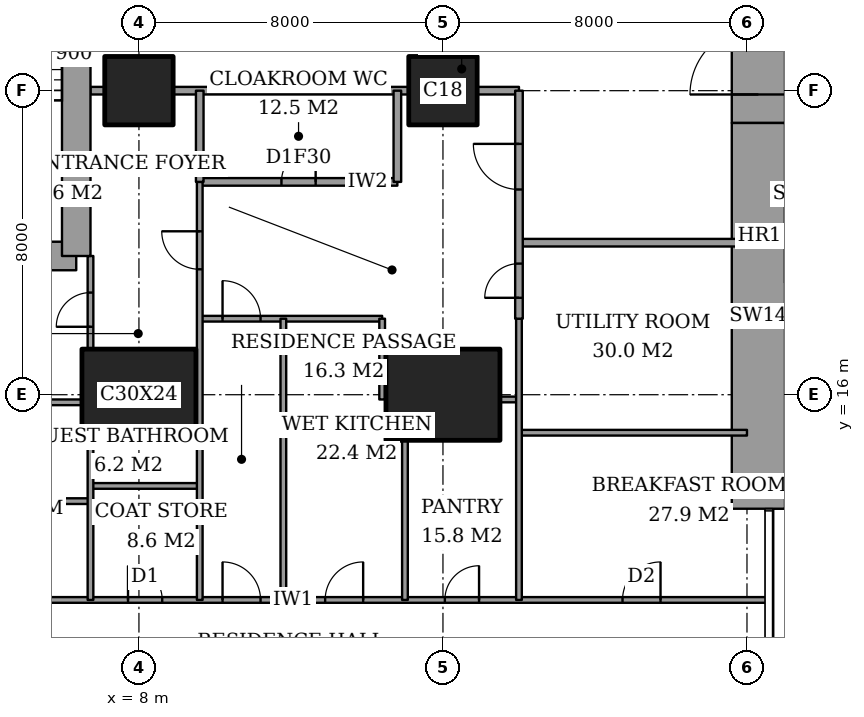
"""IFC4 building model, lengths in metres.
Left out: names, types, materials, properties, quantities, classifications, styles, units other than length and angle.
Written with IfcOpenShell. Run it as: python <this file> out.ifc"""

import sys

from ifc_helpers import new_model, si_unit, direction, frame, frame_2d, origin, origin_2d, place, context, subcontext, project, spatial, rectangle, extrude, element, fill, save


model = new_model("IFC4")
c1 = context("Model", 3, precision=1e-05, world=origin(), true_north=direction((0.0, 1.0)))
c2 = subcontext(c1, "Body", "Model", "MODEL_VIEW")
j1 = project(units=[si_unit("LENGTHUNIT", "METRE"), si_unit("PLANEANGLEUNIT", "RADIAN")], contexts=[c1])
p1 = place(None, origin())
s1 = spatial("IfcSite", under=j1, at=p1, CompositionType="ELEMENT")
p2 = place(p1, origin())
s2 = spatial("IfcBuilding", under=s1, at=p2, CompositionType="ELEMENT")
p3 = place(p2, frame((0.0, 0.0, 211.0)))
s3 = spatial("IfcBuildingStorey", under=s2, at=p3, CompositionType="ELEMENT", Elevation=211.0)
p4 = place(p3, frame((8.0, 16.0, 0.0), z_axis=(0.0, 0.0, 1.0), x_axis=(1.0, 0.0, 0.0)))
e1 = element("IfcColumn", 1, at=p4, inside=s3, PredefinedType="COLUMN", context=c2, shape_type="SweptSolid", body=[
    extrude(rectangle(XDim=3.0, YDim=2.4, at=origin_2d()), origin(), (0.0, 0.0, 1.0), 3.6),
])
p5 = place(p3, frame((8.0, 24.0, 0.0), z_axis=(0.0, 0.0, 1.0), x_axis=(1.0, 0.0, 0.0)))
e2 = element("IfcColumn", 2, at=p5, inside=s3, PredefinedType="COLUMN", context=c2, shape_type="SweptSolid", body=[
    extrude(rectangle(XDim=1.8, YDim=1.8, at=origin_2d()), origin(), (0.0, 0.0, 1.0), 3.6),
])
p6 = place(p3, frame((16.0, 16.0, 0.0), z_axis=(0.0, 0.0, 1.0), x_axis=(1.0, 0.0, 0.0)))
e3 = element("IfcColumn", 3, at=p6, inside=s3, PredefinedType="COLUMN", context=c2, shape_type="SweptSolid", body=[
    extrude(rectangle(XDim=3.0, YDim=2.4, at=origin_2d()), origin(), (0.0, 0.0, 1.0), 3.6),
])
p7 = place(p3, frame((16.0, 24.0, 0.0), z_axis=(0.0, 0.0, 1.0), x_axis=(1.0, 0.0, 0.0)))
e4 = element("IfcColumn", 4, at=p7, inside=s3, PredefinedType="COLUMN", context=c2, shape_type="SweptSolid", body=[
    extrude(rectangle(XDim=1.8, YDim=1.8, at=origin_2d()), origin(), (0.0, 0.0, 1.0), 3.6),
])
p8 = place(p3, frame((24.3, 13.0, 0.0), z_axis=(0.0, 0.0, 1.0), x_axis=(0.0, 1.0, 0.0)))
e5 = element("IfcWall", 5, at=p8, inside=s3, PredefinedType="SHEAR", context=c2, shape_type="SweptSolid", body=[
    extrude(rectangle(XDim=10.15, YDim=1.4, at=frame_2d((5.075, 0.0))), origin(), (0.0, 0.0, 1.0), 3.6),
])
p9 = place(p3, frame((24.3, 23.15, 0.0), z_axis=(0.0, 0.0, 1.0), x_axis=(0.0, 1.0, 0.0)))
e6 = element("IfcWall", 6, at=p9, inside=s3, PredefinedType="SHEAR", context=c2, shape_type="SweptSolid", body=[
    extrude(rectangle(XDim=11.85, YDim=1.4, at=frame_2d((5.925, 0.0))), origin(), (0.0, 0.0, 1.0), 3.6),
])
p10 = place(p9, frame((0.75, 0.0, 0.0)))
e7 = element("IfcOpeningElement", 7, at=p10, cuts=e6, PredefinedType="OPENING", context=c2, shape_type="SweptSolid", body=[
    extrude(rectangle(XDim=1.8, YDim=2.4, at=frame_2d((0.9, 1.2))), frame((0.0, 0.71, 0.0), z_axis=(0.0, -1.0, 0.0), x_axis=(1.0, 0.0, 0.0)), (0.0, 0.0, 1.0), 1.42),
])
p11 = place(p3, frame((1.9, 19.65, 0.0), z_axis=(0.0, 0.0, 1.0), x_axis=(1.0, 0.0, 0.0)))
e8 = element("IfcWall", 8, at=p11, inside=s3, PredefinedType="SHEAR", context=c2, shape_type="SweptSolid", body=[
    extrude(rectangle(XDim=4.45, YDim=0.75, at=frame_2d((2.225, 0.0))), origin(), (0.0, 0.0, 1.0), 3.6),
])
p12 = place(p3, frame((6.35, 19.65, 0.0), z_axis=(0.0, 0.0, 1.0), x_axis=(0.0, 1.0, 0.0)))
e9 = element("IfcWall", 9, at=p12, inside=s3, PredefinedType="SHEAR", context=c2, shape_type="SweptSolid", body=[
    extrude(rectangle(XDim=8.7, YDim=0.75, at=frame_2d((4.35, 0.0))), origin(), (0.0, 0.0, 1.0), 3.6),
])
p13 = place(p12, frame((6.725, 0.0, 0.0)))
e10 = element("IfcOpeningElement", 10, at=p13, cuts=e9, PredefinedType="OPENING", context=c2, shape_type="SweptSolid", body=[
    extrude(rectangle(XDim=1.0, YDim=2.1, at=frame_2d((0.5, 1.05))), frame((0.0, 0.385, 0.0), z_axis=(0.0, -1.0, 0.0), x_axis=(1.0, 0.0, 0.0)), (0.0, 0.0, 1.0), 0.77),
])
p14 = place(p3, frame((-0.45, 10.6, 0.0), z_axis=(0.0, 0.0, 1.0), x_axis=(1.0, 0.0, 0.0)))
e11 = element("IfcWall", 11, at=p14, inside=s3, PredefinedType="PARTITIONING", context=c2, shape_type="SweptSolid", body=[
    extrude(rectangle(XDim=25.011, YDim=0.15, at=frame_2d((12.505, 0.0))), origin(), (0.0, 0.0, 1.0), 3.35),
])
p15 = place(p14, frame((10.65, 0.0, 0.0)))
e12 = element("IfcOpeningElement", 12, at=p15, cuts=e11, PredefinedType="OPENING", context=c2, shape_type="SweptSolid", body=[
    extrude(rectangle(XDim=1.0, YDim=2.1, at=frame_2d((0.5, 1.05))), frame((0.0, 0.085, 0.0), z_axis=(0.0, -1.0, 0.0), x_axis=(1.0, 0.0, 0.0)), (0.0, 0.0, 1.0), 0.17),
])
p16 = place(p14, frame((3.087, 0.0, 0.0)))
e13 = element("IfcOpeningElement", 13, at=p16, cuts=e11, PredefinedType="OPENING", context=c2, shape_type="SweptSolid", body=[
    extrude(rectangle(XDim=1.0, YDim=2.1, at=frame_2d((0.5, 1.05))), frame((0.0, 0.085, 0.0), z_axis=(0.0, -1.0, 0.0), x_axis=(1.0, 0.0, 0.0)), (0.0, 0.0, 1.0), 0.17),
])
p17 = place(p14, frame((8.163, 0.0, 0.0)))
e14 = element("IfcOpeningElement", 14, at=p17, cuts=e11, PredefinedType="OPENING", context=c2, shape_type="SweptSolid", body=[
    extrude(rectangle(XDim=0.9, YDim=2.1, at=frame_2d((0.45, 1.05))), frame((0.0, 0.085, 0.0), z_axis=(0.0, -1.0, 0.0), x_axis=(1.0, 0.0, 0.0)), (0.0, 0.0, 1.0), 0.17),
])
p18 = place(p14, frame((13.35, 0.0, 0.0)))
e15 = element("IfcOpeningElement", 15, at=p18, cuts=e11, PredefinedType="OPENING", context=c2, shape_type="SweptSolid", body=[
    extrude(rectangle(XDim=1.0, YDim=2.1, at=frame_2d((0.5, 1.05))), frame((0.0, 0.085, 0.0), z_axis=(0.0, -1.0, 0.0), x_axis=(1.0, 0.0, 0.0)), (0.0, 0.0, 1.0), 0.17),
])
p19 = place(p14, frame((16.5, 0.0, 0.0)))
e16 = element("IfcOpeningElement", 16, at=p19, cuts=e11, PredefinedType="OPENING", context=c2, shape_type="SweptSolid", body=[
    extrude(rectangle(XDim=0.9, YDim=2.1, at=frame_2d((0.45, 1.05))), frame((0.0, 0.085, 0.0), z_axis=(0.0, -1.0, 0.0), x_axis=(1.0, 0.0, 0.0)), (0.0, 0.0, 1.0), 0.17),
])
p20 = place(p14, frame((21.175, 0.0, 0.0)))
e17 = element("IfcOpeningElement", 17, at=p20, cuts=e11, PredefinedType="OPENING", context=c2, shape_type="SweptSolid", body=[
    extrude(rectangle(XDim=1.0, YDim=2.1, at=frame_2d((0.5, 1.05))), frame((0.0, 0.085, 0.0), z_axis=(0.0, -1.0, 0.0), x_axis=(1.0, 0.0, 0.0)), (0.0, 0.0, 1.0), 0.17),
])
p21 = place(p3, frame((4.325, 13.2, 0.0), z_axis=(0.0, 0.0, 1.0), x_axis=(1.0, 0.0, 0.0)))
e18 = element("IfcWall", 18, at=p21, inside=s3, PredefinedType="PARTITIONING", context=c2, shape_type="SweptSolid", body=[
    extrude(rectangle(XDim=2.4, YDim=0.15, at=frame_2d((1.2, 0.0))), origin(), (0.0, 0.0, 1.0), 3.35),
])
p22 = place(p3, frame((6.725, 13.6, 0.0), z_axis=(0.0, 0.0, 1.0), x_axis=(1.0, 0.0, 0.0)))
e19 = element("IfcWall", 19, at=p22, inside=s3, PredefinedType="PARTITIONING", context=c2, shape_type="SweptSolid", body=[
    extrude(rectangle(XDim=2.875, YDim=0.15, at=frame_2d((1.438, 0.0))), origin(), (0.0, 0.0, 1.0), 3.35),
])
p23 = place(p3, frame((18.0, 15.0, 0.0), z_axis=(0.0, 0.0, 1.0), x_axis=(1.0, 0.0, 0.0)))
e20 = element("IfcWall", 20, at=p23, inside=s3, PredefinedType="PARTITIONING", context=c2, shape_type="SweptSolid", body=[
    extrude(rectangle(XDim=6.0, YDim=0.15, at=frame_2d((3.0, 0.0))), origin(), (0.0, 0.0, 1.0), 3.35),
])
p24 = place(p3, frame((1.25, 15.8, 0.0), z_axis=(0.0, 0.0, 1.0), x_axis=(1.0, 0.0, 0.0)))
e21 = element("IfcWall", 21, at=p24, inside=s3, PredefinedType="PARTITIONING", context=c2, shape_type="SweptSolid", body=[
    extrude(rectangle(XDim=5.25, YDim=0.15, at=frame_2d((2.625, 0.0))), origin(), (0.0, 0.0, 1.0), 3.35),
])
p25 = place(p3, frame((17.5, 15.875, 0.0), z_axis=(0.0, 0.0, 1.0), x_axis=(1.0, 0.0, 0.0)))
e22 = element("IfcWall", 22, at=p25, inside=s3, PredefinedType="PARTITIONING", context=c2, shape_type="SweptSolid", body=[
    extrude(rectangle(XDim=0.5, YDim=0.15, at=frame_2d((0.25, 0.0))), origin(), (0.0, 0.0, 1.0), 2.634),
])
p26 = place(p3, frame((9.6, 18.0, 0.0), z_axis=(0.0, 0.0, 1.0), x_axis=(1.0, 0.0, 0.0)))
e23 = element("IfcWall", 23, at=p26, inside=s3, PredefinedType="PARTITIONING", context=c2, shape_type="SweptSolid", body=[
    extrude(rectangle(XDim=4.8, YDim=0.15, at=frame_2d((2.4, 0.0))), origin(), (0.0, 0.0, 1.0), 3.35),
])
p27 = place(p26, frame((0.6, 0.0, 0.0)))
e24 = element("IfcOpeningElement", 24, at=p27, cuts=e23, PredefinedType="OPENING", context=c2, shape_type="SweptSolid", body=[
    extrude(rectangle(XDim=1.0, YDim=2.1, at=frame_2d((0.5, 1.05))), frame((0.0, 0.085, 0.0), z_axis=(0.0, -1.0, 0.0), x_axis=(1.0, 0.0, 0.0)), (0.0, 0.0, 1.0), 0.17),
])
p28 = place(p3, frame((18.0, 20.0, 0.0), z_axis=(0.0, 0.0, 1.0), x_axis=(1.0, 0.0, 0.0)))
e25 = element("IfcWall", 25, at=p28, inside=s3, PredefinedType="PARTITIONING", context=c2, shape_type="SweptSolid", body=[
    extrude(rectangle(XDim=6.0, YDim=0.2, at=frame_2d((3.0, 0.0))), origin(), (0.0, 0.0, 1.0), 3.35),
])
p29 = place(p3, frame((9.6, 21.6, 0.0), z_axis=(0.0, 0.0, 1.0), x_axis=(1.0, 0.0, 0.0)))
e26 = element("IfcWall", 26, at=p29, inside=s3, PredefinedType="PARTITIONING", context=c2, shape_type="SweptSolid", body=[
    extrude(rectangle(XDim=5.2, YDim=0.2, at=frame_2d((2.6, 0.0))), origin(), (0.0, 0.0, 1.0), 3.35),
])
p30 = place(p29, frame((2.15, 0.0, 0.0)))
e27 = element("IfcOpeningElement", 27, at=p30, cuts=e26, PredefinedType="OPENING", context=c2, shape_type="SweptSolid", body=[
    extrude(rectangle(XDim=0.9, YDim=2.1, at=frame_2d((0.45, 1.05))), frame((0.0, 0.11, 0.0), z_axis=(0.0, -1.0, 0.0), x_axis=(1.0, 0.0, 0.0)), (0.0, 0.0, 1.0), 0.22),
])
p31 = place(p3, frame((6.725, 24.0, 0.0), z_axis=(0.0, 0.0, 1.0), x_axis=(1.0, 0.0, 0.0)))
e28 = element("IfcWall", 28, at=p31, inside=s3, PredefinedType="PARTITIONING", context=c2, shape_type="SweptSolid", body=[
    extrude(rectangle(XDim=0.375, YDim=0.2, at=frame_2d((0.188, 0.0))), origin(), (0.0, 0.0, 1.0), 3.35),
])
p32 = place(p3, frame((8.9, 24.0, 0.0), z_axis=(0.0, 0.0, 1.0), x_axis=(1.0, 0.0, 0.0)))
e29 = element("IfcWall", 29, at=p32, inside=s3, PredefinedType="PARTITIONING", context=c2, shape_type="SweptSolid", body=[
    extrude(rectangle(XDim=6.2, YDim=0.2, at=frame_2d((3.1, 0.0))), origin(), (0.0, 0.0, 1.0), 3.35),
])
p33 = place(p3, frame((16.9, 24.0, 0.0), z_axis=(0.0, 0.0, 1.0), x_axis=(1.0, 0.0, 0.0)))
e30 = element("IfcWall", 30, at=p33, inside=s3, PredefinedType="PARTITIONING", context=c2, shape_type="SweptSolid", body=[
    extrude(rectangle(XDim=1.1, YDim=0.2, at=frame_2d((0.55, 0.0))), origin(), (0.0, 0.0, 1.0), 3.35),
])
p34 = place(p3, frame((6.725, 10.6, 0.0), z_axis=(0.0, 0.0, 1.0), x_axis=(0.0, 1.0, 0.0)))
e31 = element("IfcWall", 31, at=p34, inside=s3, PredefinedType="PARTITIONING", context=c2, shape_type="SweptSolid", body=[
    extrude(rectangle(XDim=4.2, YDim=0.15, at=frame_2d((2.1, 0.0))), origin(), (0.0, 0.0, 1.0), 3.35),
])
p35 = place(p3, frame((6.725, 17.2, 0.0), z_axis=(0.0, 0.0, 1.0), x_axis=(0.0, 1.0, 0.0)))
e32 = element("IfcWall", 32, at=p35, inside=s3, PredefinedType="PARTITIONING", context=c2, shape_type="SweptSolid", body=[
    extrude(rectangle(XDim=2.45, YDim=0.15, at=frame_2d((1.225, 0.0))), origin(), (0.0, 0.0, 1.0), 3.35),
])
p36 = place(p35, frame((0.587, 0.0, 0.0)))
e33 = element("IfcOpeningElement", 33, at=p36, cuts=e32, PredefinedType="OPENING", context=c2, shape_type="SweptSolid", body=[
    extrude(rectangle(XDim=0.9, YDim=2.1, at=frame_2d((0.45, 1.05))), frame((0.0, 0.085, 0.0), z_axis=(0.0, -1.0, 0.0), x_axis=(1.0, 0.0, 0.0)), (0.0, 0.0, 1.0), 0.17),
])
p37 = place(p3, frame((9.6, 21.6, 0.0), z_axis=(0.0, 0.0, 1.0), x_axis=(0.0, 1.0, 0.0)))
e34 = element("IfcWall", 34, at=p37, inside=s3, PredefinedType="PARTITIONING", context=c2, shape_type="SweptSolid", body=[
    extrude(rectangle(XDim=2.4, YDim=0.2, at=frame_2d((1.2, 0.0))), origin(), (0.0, 0.0, 1.0), 3.35),
])
p38 = place(p3, frame((9.6, 10.6, 0.0), z_axis=(0.0, 0.0, 1.0), x_axis=(0.0, 1.0, 0.0)))
e35 = element("IfcWall", 35, at=p38, inside=s3, PredefinedType="PARTITIONING", context=c2, shape_type="SweptSolid", body=[
    extrude(rectangle(XDim=11.0, YDim=0.15, at=frame_2d((5.5, 0.0))), origin(), (0.0, 0.0, 1.0), 3.35),
])
p39 = place(p38, frame((8.7, 0.0, 0.0)))
e36 = element("IfcOpeningElement", 36, at=p39, cuts=e35, PredefinedType="OPENING", context=c2, shape_type="SweptSolid", body=[
    extrude(rectangle(XDim=1.0, YDim=2.1, at=frame_2d((0.5, 1.05))), frame((0.0, 0.085, 0.0), z_axis=(0.0, -1.0, 0.0), x_axis=(1.0, 0.0, 0.0)), (0.0, 0.0, 1.0), 0.17),
])
p40 = place(p3, frame((11.8, 10.6, 0.0), z_axis=(0.0, 0.0, 1.0), x_axis=(0.0, 1.0, 0.0)))
e37 = element("IfcWall", 37, at=p40, inside=s3, PredefinedType="PARTITIONING", context=c2, shape_type="SweptSolid", body=[
    extrude(rectangle(XDim=7.4, YDim=0.15, at=frame_2d((3.7, 0.0))), origin(), (0.0, 0.0, 1.0), 3.35),
])
p41 = place(p3, frame((14.4, 15.875, 0.0), z_axis=(0.0, 0.0, 1.0), x_axis=(0.0, 1.0, 0.0)))
e38 = element("IfcWall", 38, at=p41, inside=s3, PredefinedType="PARTITIONING", context=c2, shape_type="SweptSolid", body=[
    extrude(rectangle(XDim=2.125, YDim=0.15, at=frame_2d((1.062, 0.0))), origin(), (0.0, 0.0, 1.0), 3.35),
])
p42 = place(p3, frame((14.8, 21.6, 0.0), z_axis=(0.0, 0.0, 1.0), x_axis=(0.0, 1.0, 0.0)))
e39 = element("IfcWall", 39, at=p42, inside=s3, PredefinedType="PARTITIONING", context=c2, shape_type="SweptSolid", body=[
    extrude(rectangle(XDim=2.4, YDim=0.2, at=frame_2d((1.2, 0.0))), origin(), (0.0, 0.0, 1.0), 3.35),
])
p43 = place(p3, frame((15.0, 10.6, 0.0), z_axis=(0.0, 0.0, 1.0), x_axis=(0.0, 1.0, 0.0)))
e40 = element("IfcWall", 40, at=p43, inside=s3, PredefinedType="PARTITIONING", context=c2, shape_type="SweptSolid", body=[
    extrude(rectangle(XDim=4.2, YDim=0.15, at=frame_2d((2.1, 0.0))), origin(), (0.0, 0.0, 1.0), 3.35),
])
p44 = place(p3, frame((18.0, 18.0, 0.0), z_axis=(0.0, 0.0, 1.0), x_axis=(0.0, 1.0, 0.0)))
e41 = element("IfcWall", 41, at=p44, inside=s3, PredefinedType="PARTITIONING", context=c2, shape_type="SweptSolid", body=[
    extrude(rectangle(XDim=6.0, YDim=0.2, at=frame_2d((3.0, 0.0))), origin(), (0.0, 0.0, 1.0), 3.35),
])
p45 = place(p44, frame((3.4, 0.0, 0.0)))
e42 = element("IfcOpeningElement", 42, at=p45, cuts=e41, PredefinedType="OPENING", context=c2, shape_type="SweptSolid", body=[
    extrude(rectangle(XDim=1.2, YDim=2.4, at=frame_2d((0.6, 1.2))), frame((0.0, 0.11, 0.0), z_axis=(0.0, -1.0, 0.0), x_axis=(1.0, 0.0, 0.0)), (0.0, 0.0, 1.0), 0.22),
])
p46 = place(p44, frame((0.55, 0.0, 0.0)))
e43 = element("IfcOpeningElement", 43, at=p46, cuts=e41, PredefinedType="OPENING", context=c2, shape_type="SweptSolid", body=[
    extrude(rectangle(XDim=0.9, YDim=2.1, at=frame_2d((0.45, 1.05))), frame((0.0, 0.11, 0.0), z_axis=(0.0, -1.0, 0.0), x_axis=(1.0, 0.0, 0.0)), (0.0, 0.0, 1.0), 0.22),
])
p47 = place(p3, frame((18.0, 10.6, 0.0), z_axis=(0.0, 0.0, 1.0), x_axis=(0.0, 1.0, 0.0)))
e44 = element("IfcWall", 44, at=p47, inside=s3, PredefinedType="PARTITIONING", context=c2, shape_type="SweptSolid", body=[
    extrude(rectangle(XDim=7.4, YDim=0.15, at=frame_2d((3.7, 0.0))), origin(), (0.0, 0.0, 1.0), 3.35),
])
p48 = place(p15, origin())
e45 = element("IfcDoor", 45, at=p48, inside=s3, OperationType="SINGLE_SWING_RIGHT", PredefinedType="DOOR", context=c2, shape_type="SweptSolid", body=[
    extrude(rectangle(XDim=1.0, YDim=2.1, at=frame_2d((0.5, 1.05))), frame((0.0, 0.025, 0.0), z_axis=(0.0, -1.0, 0.0), x_axis=(1.0, 0.0, 0.0)), (0.0, 0.0, 1.0), 0.05),
])
fill(e12, e45)
p49 = place(p36, origin())
e46 = element("IfcDoor", 46, at=p49, inside=s3, OperationType="SINGLE_SWING_RIGHT", PredefinedType="DOOR", context=c2, shape_type="SweptSolid", body=[
    extrude(rectangle(XDim=0.9, YDim=2.1, at=frame_2d((0.45, 1.05))), frame((0.0, 0.025, 0.0), z_axis=(0.0, -1.0, 0.0), x_axis=(1.0, 0.0, 0.0)), (0.0, 0.0, 1.0), 0.05),
])
fill(e33, e46)
p50 = place(p17, origin())
e47 = element("IfcDoor", 47, at=p50, inside=s3, OperationType="SINGLE_SWING_RIGHT", PredefinedType="DOOR", context=c2, shape_type="SweptSolid", body=[
    extrude(rectangle(XDim=0.9, YDim=2.1, at=frame_2d((0.45, 1.05))), frame((0.0, 0.025, 0.0), z_axis=(0.0, -1.0, 0.0), x_axis=(1.0, 0.0, 0.0)), (0.0, 0.0, 1.0), 0.05),
])
fill(e14, e47)
p51 = place(p39, origin())
e48 = element("IfcDoor", 48, at=p51, inside=s3, OperationType="SINGLE_SWING_LEFT", PredefinedType="DOOR", context=c2, shape_type="SweptSolid", body=[
    extrude(rectangle(XDim=1.0, YDim=2.1, at=frame_2d((0.5, 1.05))), frame((0.0, 0.025, 0.0), z_axis=(0.0, -1.0, 0.0), x_axis=(1.0, 0.0, 0.0)), (0.0, 0.0, 1.0), 0.05),
])
fill(e36, e48)
p52 = place(p30, origin())
e49 = element("IfcDoor", 49, at=p52, inside=s3, OperationType="SINGLE_SWING_LEFT", PredefinedType="DOOR", context=c2, shape_type="SweptSolid", body=[
    extrude(rectangle(XDim=0.9, YDim=2.1, at=frame_2d((0.45, 1.05))), frame((0.0, 0.025, 0.0), z_axis=(0.0, -1.0, 0.0), x_axis=(1.0, 0.0, 0.0)), (0.0, 0.0, 1.0), 0.05),
])
fill(e27, e49)
p53 = place(p45, origin())
e50 = element("IfcDoor", 50, at=p53, inside=s3, OperationType="SINGLE_SWING_LEFT", PredefinedType="DOOR", context=c2, shape_type="SweptSolid", body=[
    extrude(rectangle(XDim=1.2, YDim=2.4, at=frame_2d((0.6, 1.2))), frame((0.0, 0.025, 0.0), z_axis=(0.0, -1.0, 0.0), x_axis=(1.0, 0.0, 0.0)), (0.0, 0.0, 1.0), 0.05),
])
fill(e42, e50)
p54 = place(p27, origin())
e51 = element("IfcDoor", 51, at=p54, inside=s3, OperationType="SINGLE_SWING_RIGHT", PredefinedType="DOOR", context=c2, shape_type="SweptSolid", body=[
    extrude(rectangle(XDim=1.0, YDim=2.1, at=frame_2d((0.5, 1.05))), frame((0.0, 0.025, 0.0), z_axis=(0.0, -1.0, 0.0), x_axis=(1.0, 0.0, 0.0)), (0.0, 0.0, 1.0), 0.05),
])
fill(e24, e51)
p55 = place(p18, origin())
e52 = element("IfcDoor", 52, at=p55, inside=s3, OperationType="SINGLE_SWING_LEFT", PredefinedType="DOOR", context=c2, shape_type="SweptSolid", body=[
    extrude(rectangle(XDim=1.0, YDim=2.1, at=frame_2d((0.5, 1.05))), frame((0.0, 0.025, 0.0), z_axis=(0.0, -1.0, 0.0), x_axis=(1.0, 0.0, 0.0)), (0.0, 0.0, 1.0), 0.05),
])
fill(e15, e52)
p56 = place(p19, origin())
e53 = element("IfcDoor", 53, at=p56, inside=s3, OperationType="SINGLE_SWING_LEFT", PredefinedType="DOOR", context=c2, shape_type="SweptSolid", body=[
    extrude(rectangle(XDim=0.9, YDim=2.1, at=frame_2d((0.45, 1.05))), frame((0.0, 0.025, 0.0), z_axis=(0.0, -1.0, 0.0), x_axis=(1.0, 0.0, 0.0)), (0.0, 0.0, 1.0), 0.05),
])
fill(e16, e53)
p57 = place(p20, origin())
e54 = element("IfcDoor", 54, at=p57, inside=s3, OperationType="SINGLE_SWING_LEFT", PredefinedType="DOOR", context=c2, shape_type="SweptSolid", body=[
    extrude(rectangle(XDim=1.0, YDim=2.1, at=frame_2d((0.5, 1.05))), frame((0.0, 0.025, 0.0), z_axis=(0.0, -1.0, 0.0), x_axis=(1.0, 0.0, 0.0)), (0.0, 0.0, 1.0), 0.05),
])
fill(e17, e54)
p58 = place(p46, origin())
e55 = element("IfcDoor", 55, at=p58, inside=s3, OperationType="SINGLE_SWING_RIGHT", PredefinedType="DOOR", context=c2, shape_type="SweptSolid", body=[
    extrude(rectangle(XDim=0.9, YDim=2.1, at=frame_2d((0.45, 1.05))), frame((0.0, 0.025, 0.0), z_axis=(0.0, -1.0, 0.0), x_axis=(1.0, 0.0, 0.0)), (0.0, 0.0, 1.0), 0.05),
])
fill(e43, e55)
p59 = place(p10, origin())
e56 = element("IfcDoor", 56, at=p59, inside=s3, OperationType="DOUBLE_DOOR_DOUBLE_SWING", PredefinedType="DOOR", context=c2, shape_type="SweptSolid", body=[
    extrude(rectangle(XDim=1.8, YDim=2.4, at=frame_2d((0.9, 1.2))), frame((0.0, 0.025, 0.0), z_axis=(0.0, -1.0, 0.0), x_axis=(1.0, 0.0, 0.0)), (0.0, 0.0, 1.0), 0.05),
])
fill(e7, e56)
save(model, sys.argv[1])
